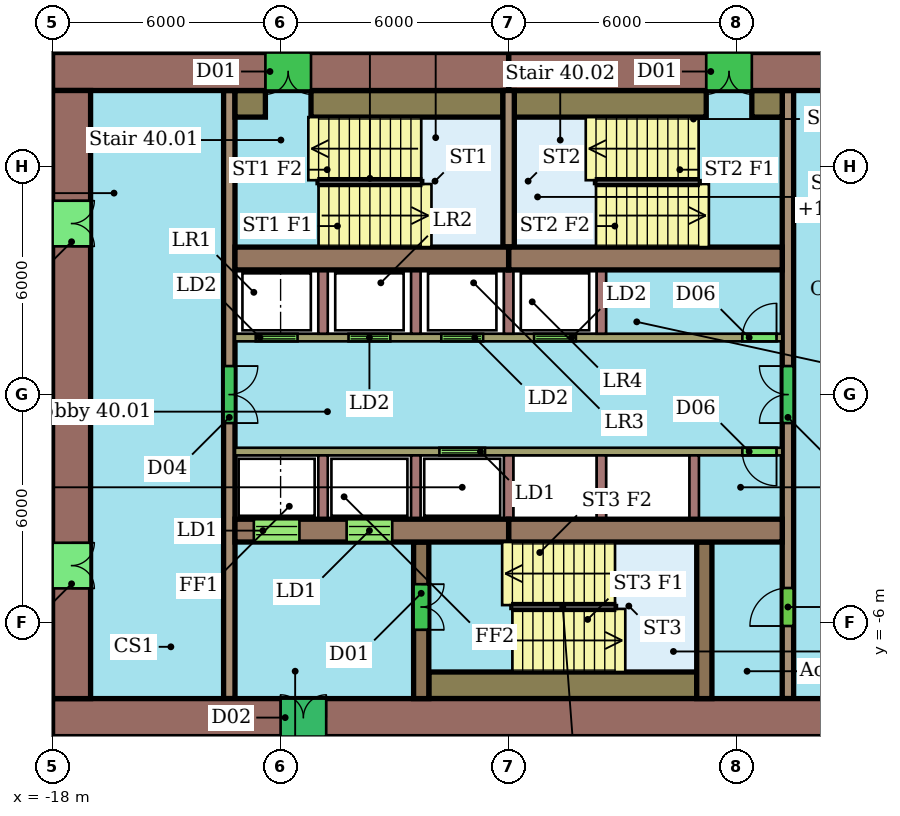
"""IFC4 building model, lengths in metres.
Left out: names, types, materials, properties, quantities, classifications, styles, units other than length and angle.
Written with IfcOpenShell. Run it as: python <this file> out.ifc"""

import sys

from ifc_helpers import new_model, si_unit, direction, frame, frame_2d, origin, place, context, subcontext, project, spatial, rectangle, extrude, element, fill, save


model = new_model("IFC4")
c1 = context("Model", 3, precision=1e-05, world=origin(), true_north=direction((0.0, 1.0)))
c2 = subcontext(c1, "Body", "Model", "MODEL_VIEW")
j1 = project(units=[si_unit("LENGTHUNIT", "METRE"), si_unit("PLANEANGLEUNIT", "RADIAN")], contexts=[c1])
p1 = place(None, origin())
s1 = spatial("IfcSite", under=j1, at=p1, CompositionType="ELEMENT")
p2 = place(p1, origin())
s2 = spatial("IfcBuilding", under=s1, at=p2, CompositionType="ELEMENT")
p3 = place(p2, frame((0.0, 0.0, 168.6)))
s3 = spatial("IfcBuildingStorey", under=s2, at=p3, CompositionType="ELEMENT", Elevation=168.6)
p4 = place(p3, frame((6.0, 8.5, 0.0), z_axis=(0.0, 0.0, 1.0), x_axis=(-1.0, 0.0, 0.0)))
e1 = element("IfcWall", 1, at=p4, inside=s3, PredefinedType="SHEAR", context=c2, shape_type="SweptSolid", body=[
    extrude(rectangle(XDim=12.0, YDim=1.0, at=frame_2d((6.0, 0.0))), origin(), (0.0, 0.0, 1.0), 3.3),
])
p5 = place(p4, frame((5.6, 0.0, 0.0)))
e2 = element("IfcOpeningElement", 2, at=p5, cuts=e1, PredefinedType="OPENING", context=c2, shape_type="SweptSolid", body=[
    extrude(rectangle(XDim=1.2, YDim=2.1, at=frame_2d((0.6, 1.05))), frame((0.0, 0.51, 0.0), z_axis=(0.0, -1.0, 0.0), x_axis=(1.0, 0.0, 0.0)), (0.0, 0.0, 1.0), 1.02),
])
p6 = place(p3, frame((-6.0, 8.5, 0.0), z_axis=(0.0, 0.0, 1.0), x_axis=(-1.0, 0.0, 0.0)))
e3 = element("IfcWall", 3, at=p6, inside=s3, PredefinedType="SHEAR", context=c2, shape_type="SweptSolid", body=[
    extrude(rectangle(XDim=12.0, YDim=1.0, at=frame_2d((6.0, 0.0))), origin(), (0.0, 0.0, 1.0), 3.3),
])
p7 = place(p6, frame((5.2, 0.0, 0.0)))
e4 = element("IfcOpeningElement", 4, at=p7, cuts=e3, PredefinedType="OPENING", context=c2, shape_type="SweptSolid", body=[
    extrude(rectangle(XDim=1.2, YDim=2.1, at=frame_2d((0.6, 1.05))), frame((0.0, 0.51, 0.0), z_axis=(0.0, -1.0, 0.0), x_axis=(1.0, 0.0, 0.0)), (0.0, 0.0, 1.0), 1.02),
])
p8 = place(p3, frame((-18.0, -8.5, 0.0), z_axis=(0.0, 0.0, 1.0), x_axis=(1.0, 0.0, 0.0)))
e5 = element("IfcWall", 5, at=p8, inside=s3, PredefinedType="SHEAR", context=c2, shape_type="SweptSolid", body=[
    extrude(rectangle(XDim=24.0, YDim=1.0, at=frame_2d((12.0, 0.0))), origin(), (0.0, 0.0, 1.0), 3.3),
])
p9 = place(p8, frame((6.0, 0.0, 0.0)))
e6 = element("IfcOpeningElement", 6, at=p9, cuts=e5, PredefinedType="OPENING", context=c2, shape_type="SweptSolid", body=[
    extrude(rectangle(XDim=1.2, YDim=2.1, at=frame_2d((0.6, 1.05))), frame((0.0, 0.51, 0.0), z_axis=(0.0, -1.0, 0.0), x_axis=(1.0, 0.0, 0.0)), (0.0, 0.0, 1.0), 1.02),
])
p10 = place(p3, frame((-17.5, 8.0, 0.0), z_axis=(0.0, 0.0, 1.0), x_axis=(0.0, -1.0, 0.0)))
e7 = element("IfcWall", 7, at=p10, inside=s3, PredefinedType="SHEAR", context=c2, shape_type="SweptSolid", body=[
    extrude(rectangle(XDim=16.0, YDim=1.0, at=frame_2d((8.0, 0.0))), origin(), (0.0, 0.0, 1.0), 3.3),
])
p11 = place(p10, frame((11.9, 0.0, 0.0)))
e8 = element("IfcOpeningElement", 8, at=p11, cuts=e7, PredefinedType="OPENING", context=c2, shape_type="SweptSolid", body=[
    extrude(rectangle(XDim=1.2, YDim=2.1, at=frame_2d((0.6, 1.05))), frame((0.0, 0.51, 0.0), z_axis=(0.0, -1.0, 0.0), x_axis=(1.0, 0.0, 0.0)), (0.0, 0.0, 1.0), 1.02),
])
p12 = place(p10, frame((2.9, 0.0, 0.0)))
e9 = element("IfcOpeningElement", 9, at=p12, cuts=e7, PredefinedType="OPENING", context=c2, shape_type="SweptSolid", body=[
    extrude(rectangle(XDim=1.2, YDim=2.1, at=frame_2d((0.6, 1.05))), frame((0.0, 0.51, 0.0), z_axis=(0.0, -1.0, 0.0), x_axis=(1.0, 0.0, 0.0)), (0.0, 0.0, 1.0), 1.02),
])
for number, where, z_axis, x_axis in (
    (10, (-13.2, 3.58, 0.0), (0.0, 0.0, 1.0), (1.0, 0.0, 0.0)),
    (11, (-6.0, 3.58, 0.0), (0.0, 0.0, 1.0), (1.0, 0.0, 0.0)),
):
    element("IfcWall", number, at=place(p3, frame(where, z_axis=z_axis, x_axis=x_axis)), inside=s3, PredefinedType="SHEAR", context=c2, shape_type="SweptSolid", body=[
        extrude(rectangle(XDim=7.2, YDim=0.6, at=frame_2d((3.6, 0.0))), origin(), (0.0, 0.0, 1.0), 3.3),
    ])
p13 = place(p3, frame((-13.2, -3.58, 0.0), z_axis=(0.0, 0.0, 1.0), x_axis=(1.0, 0.0, 0.0)))
e12 = element("IfcWall", 12, at=p13, inside=s3, PredefinedType="SHEAR", context=c2, shape_type="SweptSolid", body=[
    extrude(rectangle(XDim=7.2, YDim=0.6, at=frame_2d((3.6, 0.0))), origin(), (0.0, 0.0, 1.0), 3.3),
])
p14 = place(p13, frame((0.496, 0.0, 0.0)))
e13 = element("IfcOpeningElement", 13, at=p14, cuts=e12, PredefinedType="OPENING", context=c2, shape_type="SweptSolid", body=[
    extrude(rectangle(XDim=1.2, YDim=2.1, at=frame_2d((0.6, 1.05))), frame((0.0, 0.31, 0.0), z_axis=(0.0, -1.0, 0.0), x_axis=(1.0, 0.0, 0.0)), (0.0, 0.0, 1.0), 0.62),
])
p15 = place(p13, frame((2.938, 0.0, 0.0)))
e14 = element("IfcOpeningElement", 14, at=p15, cuts=e12, PredefinedType="OPENING", context=c2, shape_type="SweptSolid", body=[
    extrude(rectangle(XDim=1.2, YDim=2.1, at=frame_2d((0.6, 1.05))), frame((0.0, 0.31, 0.0), z_axis=(0.0, -1.0, 0.0), x_axis=(1.0, 0.0, 0.0)), (0.0, 0.0, 1.0), 0.62),
])
p16 = place(p3, frame((-6.0, -3.58, 0.0), z_axis=(0.0, 0.0, 1.0), x_axis=(1.0, 0.0, 0.0)))
e15 = element("IfcWall", 15, at=p16, inside=s3, PredefinedType="SHEAR", context=c2, shape_type="SweptSolid", body=[
    extrude(rectangle(XDim=7.2, YDim=0.6, at=frame_2d((3.6, 0.0))), origin(), (0.0, 0.0, 1.0), 3.3),
])
p17 = place(p3, frame((-13.35, 8.0, 0.0), z_axis=(0.0, 0.0, 1.0), x_axis=(0.0, -1.0, 0.0)))
e16 = element("IfcWall", 16, at=p17, inside=s3, PredefinedType="SHEAR", context=c2, shape_type="SweptSolid", body=[
    extrude(rectangle(XDim=16.0, YDim=0.3, at=frame_2d((8.0, 0.0))), origin(), (0.0, 0.0, 1.0), 3.3),
])
p18 = place(p17, frame((7.25, 0.0, 0.0)))
e17 = element("IfcOpeningElement", 17, at=p18, cuts=e16, PredefinedType="OPENING", context=c2, shape_type="SweptSolid", body=[
    extrude(rectangle(XDim=1.5, YDim=2.1, at=frame_2d((0.75, 1.05))), frame((0.0, 0.16, 0.0), z_axis=(0.0, -1.0, 0.0), x_axis=(1.0, 0.0, 0.0)), (0.0, 0.0, 1.0), 0.32),
])
p19 = place(p3, frame((1.35, -8.0, 0.0), z_axis=(0.0, 0.0, 1.0), x_axis=(0.0, 1.0, 0.0)))
e18 = element("IfcWall", 18, at=p19, inside=s3, PredefinedType="SHEAR", context=c2, shape_type="SweptSolid", body=[
    extrude(rectangle(XDim=16.0, YDim=0.3, at=frame_2d((8.0, 0.0))), origin(), (0.0, 0.0, 1.0), 3.3),
])
p20 = place(p19, frame((1.91, 0.0, 0.0)))
e19 = element("IfcOpeningElement", 19, at=p20, cuts=e18, PredefinedType="OPENING", context=c2, shape_type="SweptSolid", body=[
    extrude(rectangle(XDim=1.0, YDim=2.1, at=frame_2d((0.5, 1.05))), frame((0.0, 0.16, 0.0), z_axis=(0.0, -1.0, 0.0), x_axis=(1.0, 0.0, 0.0)), (0.0, 0.0, 1.0), 0.32),
])
p21 = place(p19, frame((7.25, 0.0, 0.0)))
e20 = element("IfcOpeningElement", 20, at=p21, cuts=e18, PredefinedType="OPENING", context=c2, shape_type="SweptSolid", body=[
    extrude(rectangle(XDim=1.5, YDim=2.1, at=frame_2d((0.75, 1.05))), frame((0.0, 0.16, 0.0), z_axis=(0.0, -1.0, 0.0), x_axis=(1.0, 0.0, 0.0)), (0.0, 0.0, 1.0), 0.32),
])
p22 = place(p3, frame((-13.2, 1.5, 0.0), z_axis=(0.0, 0.0, 1.0), x_axis=(1.0, 0.0, 0.0)))
e21 = element("IfcWall", 21, at=p22, inside=s3, PredefinedType="SHEAR", context=c2, shape_type="SweptSolid", body=[
    extrude(rectangle(XDim=14.4, YDim=0.2, at=frame_2d((7.2, 0.0))), origin(), (0.0, 0.0, 1.0), 3.3),
])
p23 = place(p22, frame((0.546, 0.0, 0.0)))
e22 = element("IfcOpeningElement", 22, at=p23, cuts=e21, PredefinedType="OPENING", context=c2, shape_type="SweptSolid", body=[
    extrude(rectangle(XDim=1.1, YDim=2.1, at=frame_2d((0.55, 1.05))), frame((0.0, 0.11, 0.0), z_axis=(0.0, -1.0, 0.0), x_axis=(1.0, 0.0, 0.0)), (0.0, 0.0, 1.0), 0.22),
])
p24 = place(p22, frame((2.988, 0.0, 0.0)))
e23 = element("IfcOpeningElement", 23, at=p24, cuts=e21, PredefinedType="OPENING", context=c2, shape_type="SweptSolid", body=[
    extrude(rectangle(XDim=1.1, YDim=2.1, at=frame_2d((0.55, 1.05))), frame((0.0, 0.11, 0.0), z_axis=(0.0, -1.0, 0.0), x_axis=(1.0, 0.0, 0.0)), (0.0, 0.0, 1.0), 0.22),
])
p25 = place(p22, frame((5.429, 0.0, 0.0)))
e24 = element("IfcOpeningElement", 24, at=p25, cuts=e21, PredefinedType="OPENING", context=c2, shape_type="SweptSolid", body=[
    extrude(rectangle(XDim=1.1, YDim=2.1, at=frame_2d((0.55, 1.05))), frame((0.0, 0.11, 0.0), z_axis=(0.0, -1.0, 0.0), x_axis=(1.0, 0.0, 0.0)), (0.0, 0.0, 1.0), 0.22),
])
p26 = place(p22, frame((7.871, 0.0, 0.0)))
e25 = element("IfcOpeningElement", 25, at=p26, cuts=e21, PredefinedType="OPENING", context=c2, shape_type="SweptSolid", body=[
    extrude(rectangle(XDim=1.1, YDim=2.1, at=frame_2d((0.55, 1.05))), frame((0.0, 0.11, 0.0), z_axis=(0.0, -1.0, 0.0), x_axis=(1.0, 0.0, 0.0)), (0.0, 0.0, 1.0), 0.22),
])
p27 = place(p22, frame((13.35, 0.0, 0.0)))
e26 = element("IfcOpeningElement", 26, at=p27, cuts=e21, PredefinedType="OPENING", context=c2, shape_type="SweptSolid", body=[
    extrude(rectangle(XDim=0.9, YDim=2.1, at=frame_2d((0.45, 1.05))), frame((0.0, 0.11, 0.0), z_axis=(0.0, -1.0, 0.0), x_axis=(1.0, 0.0, 0.0)), (0.0, 0.0, 1.0), 0.22),
])
p28 = place(p3, frame((1.2, -1.5, 0.0), z_axis=(0.0, 0.0, 1.0), x_axis=(-1.0, 0.0, 0.0)))
e27 = element("IfcWall", 27, at=p28, inside=s3, PredefinedType="SHEAR", context=c2, shape_type="SweptSolid", body=[
    extrude(rectangle(XDim=14.4, YDim=0.2, at=frame_2d((7.2, 0.0))), origin(), (0.0, 0.0, 1.0), 3.3),
])
p29 = place(p28, frame((7.821, 0.0, 0.0)))
e28 = element("IfcOpeningElement", 28, at=p29, cuts=e27, PredefinedType="OPENING", context=c2, shape_type="SweptSolid", body=[
    extrude(rectangle(XDim=1.2, YDim=2.1, at=frame_2d((0.6, 1.05))), frame((0.0, 0.11, 0.0), z_axis=(0.0, -1.0, 0.0), x_axis=(1.0, 0.0, 0.0)), (0.0, 0.0, 1.0), 0.22),
])
p30 = place(p28, frame((0.15, 0.0, 0.0)))
e29 = element("IfcOpeningElement", 29, at=p30, cuts=e27, PredefinedType="OPENING", context=c2, shape_type="SweptSolid", body=[
    extrude(rectangle(XDim=0.9, YDim=2.1, at=frame_2d((0.45, 1.05))), frame((0.0, 0.11, 0.0), z_axis=(0.0, -1.0, 0.0), x_axis=(1.0, 0.0, 0.0)), (0.0, 0.0, 1.0), 0.22),
])
p31 = place(p3, frame((-8.3, -3.88, 0.0), z_axis=(0.0, 0.0, 1.0), x_axis=(0.0, -1.0, 0.0)))
e30 = element("IfcWall", 30, at=p31, inside=s3, PredefinedType="SHEAR", context=c2, shape_type="SweptSolid", body=[
    extrude(rectangle(XDim=4.12, YDim=0.4, at=frame_2d((2.06, 0.0))), origin(), (0.0, 0.0, 1.0), 3.3),
])
p32 = place(p31, frame((1.11, 0.0, 0.0)))
e31 = element("IfcOpeningElement", 31, at=p32, cuts=e30, PredefinedType="OPENING", context=c2, shape_type="SweptSolid", body=[
    extrude(rectangle(XDim=1.2, YDim=2.1, at=frame_2d((0.6, 1.05))), frame((0.0, 0.21, 0.0), z_axis=(0.0, -1.0, 0.0), x_axis=(1.0, 0.0, 0.0)), (0.0, 0.0, 1.0), 0.42),
])
p33 = place(p3, frame((-0.85, -3.88, 0.0), z_axis=(0.0, 0.0, 1.0), x_axis=(0.0, -1.0, 0.0)))
e32 = element("IfcWall", 32, at=p33, inside=s3, PredefinedType="SHEAR", context=c2, shape_type="SweptSolid", body=[
    extrude(rectangle(XDim=4.12, YDim=0.4, at=frame_2d((2.06, 0.0))), origin(), (0.0, 0.0, 1.0), 3.3),
])
p34 = place(p3, frame((-6.0, 3.88, 0.0), z_axis=(0.0, 0.0, 1.0), x_axis=(0.0, 1.0, 0.0)))
e33 = element("IfcWall", 33, at=p34, inside=s3, PredefinedType="SHEAR", context=c2, shape_type="SweptSolid", body=[
    extrude(rectangle(XDim=4.12, YDim=0.3, at=frame_2d((2.06, 0.0))), origin(), (0.0, 0.0, 1.0), 3.3),
])
p35 = place(p3, frame((-13.2, 7.65, 0.0), z_axis=(0.0, 0.0, 1.0), x_axis=(1.0, 0.0, 0.0)))
e34 = element("IfcWall", 34, at=p35, inside=s3, PredefinedType="SHEAR", context=c2, shape_type="SweptSolid", body=[
    extrude(rectangle(XDim=0.8, YDim=0.7, at=frame_2d((0.4, 0.0))), origin(), (0.0, 0.0, 1.0), 3.3),
])
for number, where, z_axis, x_axis in (
    (35, (-11.2, 7.65, 0.0), (0.0, 0.0, 1.0), (1.0, 0.0, 0.0)),
    (36, (-5.85, 7.65, 0.0), (0.0, 0.0, 1.0), (1.0, 0.0, 0.0)),
):
    element("IfcWall", number, at=place(p3, frame(where, z_axis=z_axis, x_axis=x_axis)), inside=s3, PredefinedType="SHEAR", context=c2, shape_type="SweptSolid", body=[
        extrude(rectangle(XDim=5.05, YDim=0.7, at=frame_2d((2.525, 0.0))), origin(), (0.0, 0.0, 1.0), 3.3),
    ])
p36 = place(p3, frame((0.4, 7.65, 0.0), z_axis=(0.0, 0.0, 1.0), x_axis=(1.0, 0.0, 0.0)))
e37 = element("IfcWall", 37, at=p36, inside=s3, PredefinedType="SHEAR", context=c2, shape_type="SweptSolid", body=[
    extrude(rectangle(XDim=0.8, YDim=0.7, at=frame_2d((0.4, 0.0))), origin(), (0.0, 0.0, 1.0), 3.3),
])
p37 = place(p3, frame((-8.1, -7.65, 0.0), z_axis=(0.0, 0.0, 1.0), x_axis=(1.0, 0.0, 0.0)))
e38 = element("IfcWall", 38, at=p37, inside=s3, PredefinedType="SHEAR", context=c2, shape_type="SweptSolid", body=[
    extrude(rectangle(XDim=7.05, YDim=0.7, at=frame_2d((3.525, 0.0))), origin(), (0.0, 0.0, 1.0), 3.3),
])
for number, where, z_axis, x_axis in (
    (39, (-10.883, 1.6, 0.0), (0.0, 0.0, 1.0), (0.0, 1.0, 0.0)),
    (40, (-8.442, 1.6, 0.0), (0.0, 0.0, 1.0), (0.0, 1.0, 0.0)),
    (41, (-6.0, 1.6, 0.0), (0.0, 0.0, 1.0), (0.0, 1.0, 0.0)),
    (42, (-3.558, 1.6, 0.0), (0.0, 0.0, 1.0), (0.0, 1.0, 0.0)),
    (43, (-10.883, -1.6, 0.0), (0.0, 0.0, 1.0), (0.0, -1.0, 0.0)),
    (44, (-8.442, -1.6, 0.0), (0.0, 0.0, 1.0), (0.0, -1.0, 0.0)),
    (45, (-6.0, -1.6, 0.0), (0.0, 0.0, 1.0), (0.0, -1.0, 0.0)),
    (46, (-3.558, -1.6, 0.0), (0.0, 0.0, 1.0), (0.0, -1.0, 0.0)),
    (47, (-1.117, -1.6, 0.0), (0.0, 0.0, 1.0), (0.0, -1.0, 0.0)),
):
    element("IfcWall", number, at=place(p3, frame(where, z_axis=z_axis, x_axis=x_axis)), inside=s3, PredefinedType="SHEAR", context=c2, shape_type="SweptSolid", body=[
        extrude(rectangle(XDim=1.68, YDim=0.25, at=frame_2d((0.84, 0.0))), origin(), (0.0, 0.0, 1.0), 3.3),
    ])
p38 = place(p5, origin())
e48 = element("IfcDoor", 48, at=p38, inside=s3, OperationType="DOUBLE_DOOR_SINGLE_SWING", PredefinedType="NOTDEFINED", context=c2, shape_type="SweptSolid", body=[
    extrude(rectangle(XDim=1.2, YDim=2.1, at=frame_2d((0.6, 1.05))), frame((0.0, 0.025, 0.0), z_axis=(0.0, -1.0, 0.0), x_axis=(1.0, 0.0, 0.0)), (0.0, 0.0, 1.0), 0.05),
])
fill(e2, e48)
p39 = place(p7, origin())
e49 = element("IfcDoor", 49, at=p39, inside=s3, OperationType="DOUBLE_DOOR_SINGLE_SWING", PredefinedType="NOTDEFINED", context=c2, shape_type="SweptSolid", body=[
    extrude(rectangle(XDim=1.2, YDim=2.1, at=frame_2d((0.6, 1.05))), frame((0.0, 0.025, 0.0), z_axis=(0.0, -1.0, 0.0), x_axis=(1.0, 0.0, 0.0)), (0.0, 0.0, 1.0), 0.05),
])
fill(e4, e49)
p40 = place(p9, origin())
e50 = element("IfcDoor", 50, at=p40, inside=s3, OperationType="DOUBLE_DOOR_SINGLE_SWING", PredefinedType="NOTDEFINED", context=c2, shape_type="SweptSolid", body=[
    extrude(rectangle(XDim=1.2, YDim=2.1, at=frame_2d((0.6, 1.05))), frame((0.0, 0.025, 0.0), z_axis=(0.0, -1.0, 0.0), x_axis=(1.0, 0.0, 0.0)), (0.0, 0.0, 1.0), 0.05),
])
fill(e6, e50)
p41 = place(p11, origin())
e51 = element("IfcDoor", 51, at=p41, inside=s3, OperationType="DOUBLE_DOOR_SINGLE_SWING", PredefinedType="NOTDEFINED", context=c2, shape_type="SweptSolid", body=[
    extrude(rectangle(XDim=1.2, YDim=2.1, at=frame_2d((0.6, 1.05))), frame((0.0, 0.025, 0.0), z_axis=(0.0, -1.0, 0.0), x_axis=(1.0, 0.0, 0.0)), (0.0, 0.0, 1.0), 0.05),
])
fill(e8, e51)
p42 = place(p12, origin())
e52 = element("IfcDoor", 52, at=p42, inside=s3, OperationType="DOUBLE_DOOR_SINGLE_SWING", PredefinedType="NOTDEFINED", context=c2, shape_type="SweptSolid", body=[
    extrude(rectangle(XDim=1.2, YDim=2.1, at=frame_2d((0.6, 1.05))), frame((0.0, 0.025, 0.0), z_axis=(0.0, -1.0, 0.0), x_axis=(1.0, 0.0, 0.0)), (0.0, 0.0, 1.0), 0.05),
])
fill(e9, e52)
p43 = place(p14, origin())
e53 = element("IfcDoor", 53, at=p43, inside=s3, OperationType="DOUBLE_DOOR_SLIDING", PredefinedType="NOTDEFINED", context=c2, shape_type="SweptSolid", body=[
    extrude(rectangle(XDim=1.2, YDim=2.1, at=frame_2d((0.6, 1.05))), frame((0.0, 0.025, 0.0), z_axis=(0.0, -1.0, 0.0), x_axis=(1.0, 0.0, 0.0)), (0.0, 0.0, 1.0), 0.05),
])
fill(e13, e53)
p44 = place(p15, origin())
e54 = element("IfcDoor", 54, at=p44, inside=s3, OperationType="DOUBLE_DOOR_SLIDING", PredefinedType="NOTDEFINED", context=c2, shape_type="SweptSolid", body=[
    extrude(rectangle(XDim=1.2, YDim=2.1, at=frame_2d((0.6, 1.05))), frame((0.0, 0.025, 0.0), z_axis=(0.0, -1.0, 0.0), x_axis=(1.0, 0.0, 0.0)), (0.0, 0.0, 1.0), 0.05),
])
fill(e14, e54)
p45 = place(p18, origin())
e55 = element("IfcDoor", 55, at=p45, inside=s3, OperationType="DOUBLE_DOOR_SINGLE_SWING", PredefinedType="NOTDEFINED", context=c2, shape_type="SweptSolid", body=[
    extrude(rectangle(XDim=1.5, YDim=2.1, at=frame_2d((0.75, 1.05))), frame((0.0, 0.025, 0.0), z_axis=(0.0, -1.0, 0.0), x_axis=(1.0, 0.0, 0.0)), (0.0, 0.0, 1.0), 0.05),
])
fill(e17, e55)
p46 = place(p20, origin())
e56 = element("IfcDoor", 56, at=p46, inside=s3, OperationType="SINGLE_SWING_LEFT", PredefinedType="NOTDEFINED", context=c2, shape_type="SweptSolid", body=[
    extrude(rectangle(XDim=1.0, YDim=2.1, at=frame_2d((0.5, 1.05))), frame((0.0, 0.025, 0.0), z_axis=(0.0, -1.0, 0.0), x_axis=(1.0, 0.0, 0.0)), (0.0, 0.0, 1.0), 0.05),
])
fill(e19, e56)
p47 = place(p21, origin())
e57 = element("IfcDoor", 57, at=p47, inside=s3, OperationType="DOUBLE_DOOR_SINGLE_SWING", PredefinedType="NOTDEFINED", context=c2, shape_type="SweptSolid", body=[
    extrude(rectangle(XDim=1.5, YDim=2.1, at=frame_2d((0.75, 1.05))), frame((0.0, 0.025, 0.0), z_axis=(0.0, -1.0, 0.0), x_axis=(1.0, 0.0, 0.0)), (0.0, 0.0, 1.0), 0.05),
])
fill(e20, e57)
p48 = place(p23, origin())
e58 = element("IfcDoor", 58, at=p48, inside=s3, OperationType="DOUBLE_DOOR_SLIDING", PredefinedType="NOTDEFINED", context=c2, shape_type="SweptSolid", body=[
    extrude(rectangle(XDim=1.1, YDim=2.1, at=frame_2d((0.55, 1.05))), frame((0.0, 0.025, 0.0), z_axis=(0.0, -1.0, 0.0), x_axis=(1.0, 0.0, 0.0)), (0.0, 0.0, 1.0), 0.05),
])
fill(e22, e58)
p49 = place(p24, origin())
e59 = element("IfcDoor", 59, at=p49, inside=s3, OperationType="DOUBLE_DOOR_SLIDING", PredefinedType="NOTDEFINED", context=c2, shape_type="SweptSolid", body=[
    extrude(rectangle(XDim=1.1, YDim=2.1, at=frame_2d((0.55, 1.05))), frame((0.0, 0.025, 0.0), z_axis=(0.0, -1.0, 0.0), x_axis=(1.0, 0.0, 0.0)), (0.0, 0.0, 1.0), 0.05),
])
fill(e23, e59)
p50 = place(p25, origin())
e60 = element("IfcDoor", 60, at=p50, inside=s3, OperationType="DOUBLE_DOOR_SLIDING", PredefinedType="NOTDEFINED", context=c2, shape_type="SweptSolid", body=[
    extrude(rectangle(XDim=1.1, YDim=2.1, at=frame_2d((0.55, 1.05))), frame((0.0, 0.025, 0.0), z_axis=(0.0, -1.0, 0.0), x_axis=(1.0, 0.0, 0.0)), (0.0, 0.0, 1.0), 0.05),
])
fill(e24, e60)
p51 = place(p26, origin())
e61 = element("IfcDoor", 61, at=p51, inside=s3, OperationType="DOUBLE_DOOR_SLIDING", PredefinedType="NOTDEFINED", context=c2, shape_type="SweptSolid", body=[
    extrude(rectangle(XDim=1.1, YDim=2.1, at=frame_2d((0.55, 1.05))), frame((0.0, 0.025, 0.0), z_axis=(0.0, -1.0, 0.0), x_axis=(1.0, 0.0, 0.0)), (0.0, 0.0, 1.0), 0.05),
])
fill(e25, e61)
p52 = place(p27, origin())
e62 = element("IfcDoor", 62, at=p52, inside=s3, OperationType="SINGLE_SWING_RIGHT", PredefinedType="NOTDEFINED", context=c2, shape_type="SweptSolid", body=[
    extrude(rectangle(XDim=0.9, YDim=2.1, at=frame_2d((0.45, 1.05))), frame((0.0, 0.025, 0.0), z_axis=(0.0, -1.0, 0.0), x_axis=(1.0, 0.0, 0.0)), (0.0, 0.0, 1.0), 0.05),
])
fill(e26, e62)
p53 = place(p29, origin())
e63 = element("IfcDoor", 63, at=p53, inside=s3, OperationType="DOUBLE_DOOR_SLIDING", PredefinedType="NOTDEFINED", context=c2, shape_type="SweptSolid", body=[
    extrude(rectangle(XDim=1.2, YDim=2.1, at=frame_2d((0.6, 1.05))), frame((0.0, 0.025, 0.0), z_axis=(0.0, -1.0, 0.0), x_axis=(1.0, 0.0, 0.0)), (0.0, 0.0, 1.0), 0.05),
])
fill(e28, e63)
p54 = place(p30, origin())
e64 = element("IfcDoor", 64, at=p54, inside=s3, OperationType="SINGLE_SWING_LEFT", PredefinedType="NOTDEFINED", context=c2, shape_type="SweptSolid", body=[
    extrude(rectangle(XDim=0.9, YDim=2.1, at=frame_2d((0.45, 1.05))), frame((0.0, 0.025, 0.0), z_axis=(0.0, -1.0, 0.0), x_axis=(1.0, 0.0, 0.0)), (0.0, 0.0, 1.0), 0.05),
])
fill(e29, e64)
p55 = place(p32, origin())
e65 = element("IfcDoor", 65, at=p55, inside=s3, OperationType="DOUBLE_DOOR_SINGLE_SWING", PredefinedType="NOTDEFINED", context=c2, shape_type="SweptSolid", body=[
    extrude(rectangle(XDim=1.2, YDim=2.1, at=frame_2d((0.6, 1.05))), frame((0.0, 0.025, 0.0), z_axis=(0.0, -1.0, 0.0), x_axis=(1.0, 0.0, 0.0)), (0.0, 0.0, 1.0), 0.05),
])
fill(e31, e65)
save(model, sys.argv[1])
